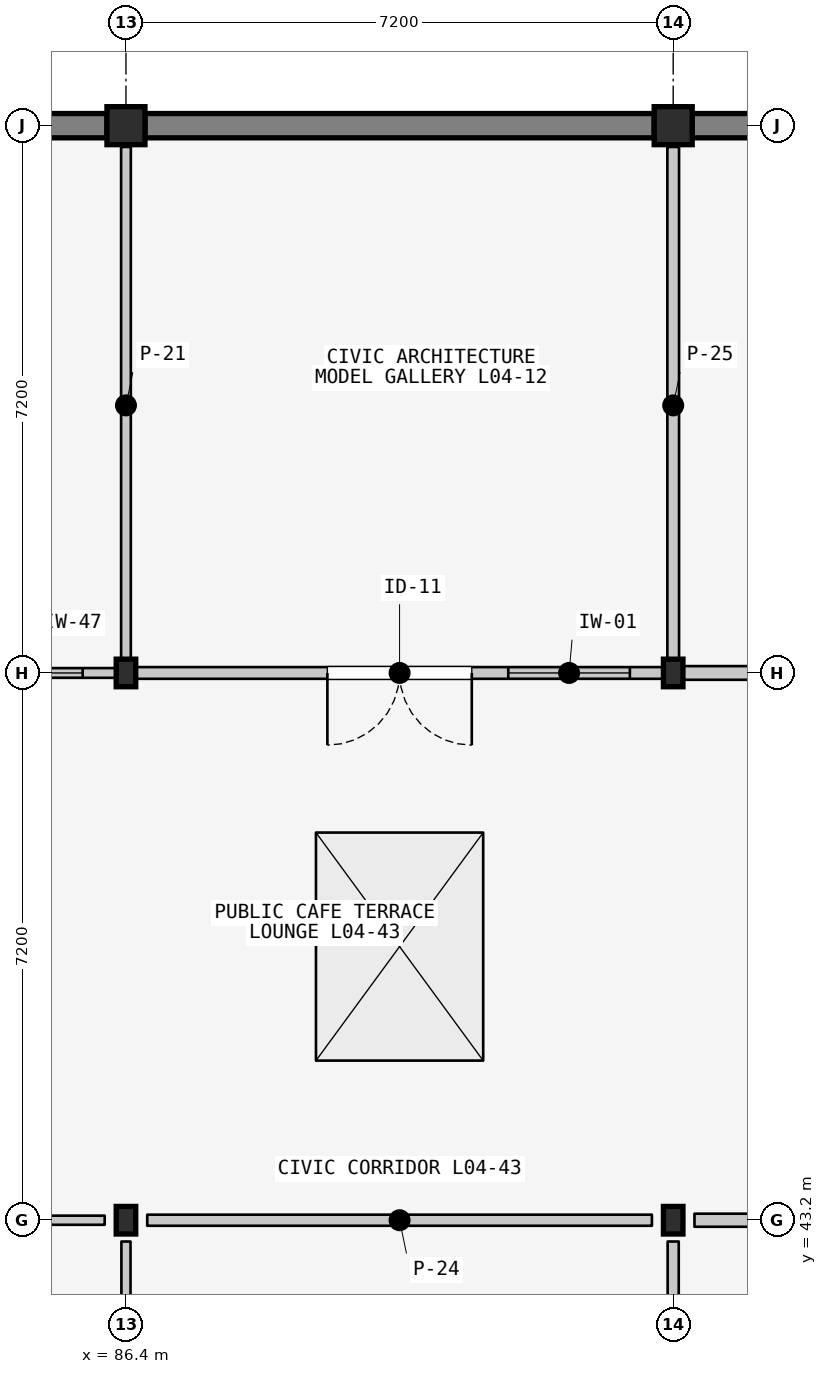
"""IFC4 building model, lengths in metres.
Left out: names, types, materials, properties, quantities, classifications, styles, units other than length and angle.
Written with IfcOpenShell. Run it as: python <this file> out.ifc"""

import sys

from ifc_helpers import new_model, si_unit, direction, frame, frame_2d, origin, origin_2d, place, context, subcontext, project, spatial, rectangle, i_section, extrude, element, fill, save


model = new_model("IFC4")
c1 = context("Model", 3, precision=1e-05, world=origin(), true_north=direction((0.0, 1.0)))
c2 = subcontext(c1, "Body", "Model", "MODEL_VIEW")
j1 = project(units=[si_unit("LENGTHUNIT", "METRE"), si_unit("PLANEANGLEUNIT", "RADIAN")], contexts=[c1])
p1 = place(None, origin())
s1 = spatial("IfcSite", under=j1, at=p1, CompositionType="ELEMENT")
p2 = place(p1, origin())
s2 = spatial("IfcBuilding", under=s1, at=p2, CompositionType="ELEMENT")
p3 = place(p2, frame((0.0, 0.0, 14.1)))
s3 = spatial("IfcBuildingStorey", under=s2, at=p3, CompositionType="ELEMENT", Elevation=14.1)
p4 = place(p3, frame((86.4, 43.2, 0.0), z_axis=(0.0, 0.0, 1.0), x_axis=(1.0, 0.0, 0.0)))
e1 = element("IfcColumn", 1, at=p4, inside=s3, PredefinedType="COLUMN", context=c2, shape_type="SweptSolid", body=[
    extrude(i_section(OverallWidth=0.257, OverallDepth=0.363, WebThickness=0.013, FlangeThickness=0.022, FilletRadius=0.015, at=origin_2d()), origin(), (0.0, 0.0, 1.0), 11.676),
])
p5 = place(p3, frame((86.4, 50.4, 0.0), z_axis=(0.0, 0.0, 1.0), x_axis=(1.0, 0.0, 0.0)))
e2 = element("IfcColumn", 2, at=p5, inside=s3, PredefinedType="COLUMN", context=c2, shape_type="SweptSolid", body=[
    extrude(i_section(OverallWidth=0.257, OverallDepth=0.363, WebThickness=0.013, FlangeThickness=0.022, FilletRadius=0.015, at=origin_2d()), origin(), (0.0, 0.0, 1.0), 13.019),
])
p6 = place(p3, frame((86.4, 57.6, 0.0), z_axis=(0.0, 0.0, 1.0), x_axis=(1.0, 0.0, 0.0)))
e3 = element("IfcColumn", 3, at=p6, inside=s3, PredefinedType="COLUMN", context=c2, shape_type="SweptSolid", body=[
    extrude(rectangle(XDim=0.5, YDim=0.5, at=origin_2d()), origin(), (0.0, 0.0, 1.0), 14.362),
])
p7 = place(p3, frame((93.6, 43.2, 0.0), z_axis=(0.0, 0.0, 1.0), x_axis=(1.0, 0.0, 0.0)))
e4 = element("IfcColumn", 4, at=p7, inside=s3, PredefinedType="COLUMN", context=c2, shape_type="SweptSolid", body=[
    extrude(i_section(OverallWidth=0.257, OverallDepth=0.363, WebThickness=0.013, FlangeThickness=0.022, FilletRadius=0.015, at=origin_2d()), origin(), (0.0, 0.0, 1.0), 11.705),
])
p8 = place(p3, frame((93.6, 50.4, 0.0), z_axis=(0.0, 0.0, 1.0), x_axis=(1.0, 0.0, 0.0)))
e5 = element("IfcColumn", 5, at=p8, inside=s3, PredefinedType="COLUMN", context=c2, shape_type="SweptSolid", body=[
    extrude(i_section(OverallWidth=0.257, OverallDepth=0.363, WebThickness=0.013, FlangeThickness=0.022, FilletRadius=0.015, at=origin_2d()), origin(), (0.0, 0.0, 1.0), 13.048),
])
p9 = place(p3, frame((93.6, 57.6, 0.0), z_axis=(0.0, 0.0, 1.0), x_axis=(1.0, 0.0, 0.0)))
e6 = element("IfcColumn", 6, at=p9, inside=s3, PredefinedType="COLUMN", context=c2, shape_type="SweptSolid", body=[
    extrude(rectangle(XDim=0.5, YDim=0.5, at=origin_2d()), origin(), (0.0, 0.0, 1.0), 14.39),
])
p10 = place(p3, frame((79.45, 57.6, 0.0), z_axis=(0.0, 0.0, 1.0), x_axis=(1.0, 0.0, 0.0)))
e7 = element("IfcWall", 7, at=p10, inside=s3, PredefinedType="SOLIDWALL", context=c2, shape_type="SweptSolid", body=[
    extrude(rectangle(XDim=6.7, YDim=0.32, at=frame_2d((3.35, 0.0))), origin(), (0.0, 0.0, 1.0), 13.606),
])
p11 = place(p3, frame((86.65, 57.6, 0.0), z_axis=(0.0, 0.0, 1.0), x_axis=(1.0, 0.0, 0.0)))
e8 = element("IfcWall", 8, at=p11, inside=s3, PredefinedType="SOLIDWALL", context=c2, shape_type="SweptSolid", body=[
    extrude(rectangle(XDim=6.7, YDim=0.32, at=frame_2d((3.35, 0.0))), origin(), (0.0, 0.0, 1.0), 13.635),
])
p12 = place(p3, frame((93.85, 57.6, 0.0), z_axis=(0.0, 0.0, 1.0), x_axis=(1.0, 0.0, 0.0)))
e9 = element("IfcWall", 9, at=p12, inside=s3, PredefinedType="SOLIDWALL", context=c2, shape_type="SweptSolid", body=[
    extrude(rectangle(XDim=6.7, YDim=0.32, at=frame_2d((3.35, 0.0))), origin(), (0.0, 0.0, 1.0), 13.663),
])
p13 = place(p3, frame((79.48, 43.2, 0.0), z_axis=(0.0, 0.0, 1.0), x_axis=(1.0, 0.0, 0.0)))
e10 = element("IfcWall", 10, at=p13, inside=s3, PredefinedType="PARTITIONING", context=c2, shape_type="SweptSolid", body=[
    extrude(rectangle(XDim=6.64, YDim=0.12, at=frame_2d((3.32, 0.0))), origin(), (0.0, 0.0, 1.0), 3.72),
])
p14 = place(p13, frame((2.545, 0.0, 0.0)))
e11 = element("IfcOpeningElement", 11, at=p14, cuts=e10, PredefinedType="OPENING", context=c2, shape_type="SweptSolid", body=[
    extrude(rectangle(XDim=1.55, YDim=2.3, at=frame_2d((0.775, 1.15))), frame((0.0, 0.07, 0.0), z_axis=(0.0, -1.0, 0.0), x_axis=(1.0, 0.0, 0.0)), (0.0, 0.0, 1.0), 0.14),
])
p15 = place(p13, frame((0.45, 0.0, 1.05)))
e12 = element("IfcOpeningElement", 12, at=p15, cuts=e10, PredefinedType="OPENING", context=c2, shape_type="SweptSolid", body=[
    extrude(rectangle(XDim=1.18, YDim=1.44, at=frame_2d((0.59, 0.72))), frame((0.0, 0.07, 0.0), z_axis=(0.0, -1.0, 0.0), x_axis=(1.0, 0.0, 0.0)), (0.0, 0.0, 1.0), 0.14),
])
p16 = place(p3, frame((86.4, 42.92, 0.0), z_axis=(0.0, 0.0, 1.0), x_axis=(0.0, -1.0, 0.0)))
e13 = element("IfcWall", 13, at=p16, inside=s3, PredefinedType="PARTITIONING", context=c2, shape_type="SweptSolid", body=[
    extrude(rectangle(XDim=6.8, YDim=0.12, at=frame_2d((3.4, 0.0))), origin(), (0.0, 0.0, 1.0), 3.72),
])
p17 = place(p3, frame((86.28, 50.4, 0.0), z_axis=(0.0, 0.0, 1.0), x_axis=(-1.0, 0.0, 0.0)))
e14 = element("IfcWall", 14, at=p17, inside=s3, PredefinedType="PARTITIONING", context=c2, shape_type="SweptSolid", body=[
    extrude(rectangle(XDim=6.96, YDim=0.128, at=frame_2d((3.48, 0.0))), origin(), (0.0, 0.0, 1.0), 3.72),
])
p18 = place(p17, frame((2.53, 0.0, 0.0)))
e15 = element("IfcOpeningElement", 15, at=p18, cuts=e14, PredefinedType="OPENING", context=c2, shape_type="SweptSolid", body=[
    extrude(rectangle(XDim=1.9, YDim=2.45, at=frame_2d((0.95, 1.225))), frame((0.0, 0.074, 0.0), z_axis=(0.0, -1.0, 0.0), x_axis=(1.0, 0.0, 0.0)), (0.0, 0.0, 1.0), 0.148),
])
p19 = place(p17, frame((0.45, 0.0, 1.05)))
e16 = element("IfcOpeningElement", 16, at=p19, cuts=e14, PredefinedType="OPENING", context=c2, shape_type="SweptSolid", body=[
    extrude(rectangle(XDim=1.28, YDim=1.44, at=frame_2d((0.64, 0.72))), frame((0.0, 0.074, 0.0), z_axis=(0.0, -1.0, 0.0), x_axis=(1.0, 0.0, 0.0)), (0.0, 0.0, 1.0), 0.148),
])
p20 = place(p3, frame((86.4, 57.32, 0.0), z_axis=(0.0, 0.0, 1.0), x_axis=(0.0, -1.0, 0.0)))
e17 = element("IfcWall", 17, at=p20, inside=s3, PredefinedType="PARTITIONING", context=c2, shape_type="SweptSolid", body=[
    extrude(rectangle(XDim=6.8, YDim=0.128, at=frame_2d((3.4, 0.0))), origin(), (0.0, 0.0, 1.0), 3.72),
])
p21 = place(p3, frame((93.6, 42.92, 0.0), z_axis=(0.0, 0.0, 1.0), x_axis=(0.0, -1.0, 0.0)))
e18 = element("IfcWall", 18, at=p21, inside=s3, PredefinedType="PARTITIONING", context=c2, shape_type="SweptSolid", body=[
    extrude(rectangle(XDim=6.8, YDim=0.146, at=frame_2d((3.4, 0.0))), origin(), (0.0, 0.0, 1.0), 3.72),
])
p22 = place(p3, frame((86.68, 43.2, 0.0), z_axis=(0.0, 0.0, 1.0), x_axis=(1.0, 0.0, 0.0)))
e19 = element("IfcWall", 19, at=p22, inside=s3, PredefinedType="PARTITIONING", context=c2, shape_type="SweptSolid", body=[
    extrude(rectangle(XDim=6.64, YDim=0.146, at=frame_2d((3.32, 0.0))), origin(), (0.0, 0.0, 1.0), 3.72),
])
p23 = place(p3, frame((93.48, 50.4, 0.0), z_axis=(0.0, 0.0, 1.0), x_axis=(-1.0, 0.0, 0.0)))
e20 = element("IfcWall", 20, at=p23, inside=s3, PredefinedType="PARTITIONING", context=c2, shape_type="SweptSolid", body=[
    extrude(rectangle(XDim=6.96, YDim=0.154, at=frame_2d((3.48, 0.0))), origin(), (0.0, 0.0, 1.0), 3.72),
])
p24 = place(p23, frame((2.53, 0.0, 0.0)))
e21 = element("IfcOpeningElement", 21, at=p24, cuts=e20, PredefinedType="OPENING", context=c2, shape_type="SweptSolid", body=[
    extrude(rectangle(XDim=1.9, YDim=2.45, at=frame_2d((0.95, 1.225))), frame((0.0, 0.087, 0.0), z_axis=(0.0, -1.0, 0.0), x_axis=(1.0, 0.0, 0.0)), (0.0, 0.0, 1.0), 0.174),
])
p25 = place(p23, frame((0.45, 0.0, 1.05)))
e22 = element("IfcOpeningElement", 22, at=p25, cuts=e20, PredefinedType="OPENING", context=c2, shape_type="SweptSolid", body=[
    extrude(rectangle(XDim=1.6, YDim=1.2, at=frame_2d((0.8, 0.6))), frame((0.0, 0.087, 0.0), z_axis=(0.0, -1.0, 0.0), x_axis=(1.0, 0.0, 0.0)), (0.0, 0.0, 1.0), 0.174),
])
p26 = place(p3, frame((93.6, 57.32, 0.0), z_axis=(0.0, 0.0, 1.0), x_axis=(0.0, -1.0, 0.0)))
e23 = element("IfcWall", 23, at=p26, inside=s3, PredefinedType="PARTITIONING", context=c2, shape_type="SweptSolid", body=[
    extrude(rectangle(XDim=6.8, YDim=0.154, at=frame_2d((3.4, 0.0))), origin(), (0.0, 0.0, 1.0), 3.72),
])
p27 = place(p3, frame((93.88, 43.2, 0.0), z_axis=(0.0, 0.0, 1.0), x_axis=(1.0, 0.0, 0.0)))
e24 = element("IfcWall", 24, at=p27, inside=s3, PredefinedType="PARTITIONING", context=c2, shape_type="SweptSolid", body=[
    extrude(rectangle(XDim=6.8, YDim=0.172, at=frame_2d((3.4, 0.0))), origin(), (0.0, 0.0, 1.0), 3.72),
])
p28 = place(p3, frame((100.68, 50.4, 0.0), z_axis=(0.0, 0.0, 1.0), x_axis=(-1.0, 0.0, 0.0)))
e25 = element("IfcWall", 25, at=p28, inside=s3, PredefinedType="PARTITIONING", context=c2, shape_type="SweptSolid", body=[
    extrude(rectangle(XDim=6.96, YDim=0.18, at=frame_2d((3.48, 0.0))), origin(), (0.0, 0.0, 1.0), 3.72),
])
p29 = place(p28, frame((2.53, 0.0, 0.0)))
e26 = element("IfcOpeningElement", 26, at=p29, cuts=e25, PredefinedType="OPENING", context=c2, shape_type="SweptSolid", body=[
    extrude(rectangle(XDim=1.9, YDim=2.45, at=frame_2d((0.95, 1.225))), frame((0.0, 0.1, 0.0), z_axis=(0.0, -1.0, 0.0), x_axis=(1.0, 0.0, 0.0)), (0.0, 0.0, 1.0), 0.2),
])
p30 = place(p3, frame((64.8, 7.2, 5.1), z_axis=(-0.003900009496, -0.183347177316, 0.983040488737), x_axis=(0.999992130387, 0.0, 0.003967261622)))
p31 = place(p30, frame((25.229, 40.283, 0.0)))
p32 = place(p31, origin())
e27 = element("IfcWindow", 27, at=p32, inside=s3, PartitioningType="SINGLE_PANEL", PredefinedType="SKYLIGHT", context=c2, shape_type="SweptSolid", body=[
    extrude(rectangle(XDim=2.2, YDim=3.0, at=origin_2d()), origin(), (0.0, 0.0, -1.0), 0.06),
])
p33 = place(p19, origin())
e28 = element("IfcWindow", 28, at=p33, inside=s3, PartitioningType="SINGLE_PANEL", PredefinedType="WINDOW", context=c2, shape_type="SweptSolid", body=[
    extrude(rectangle(XDim=1.28, YDim=1.44, at=frame_2d((0.64, 0.72))), frame((0.0, 0.03, 0.0), z_axis=(0.0, -1.0, 0.0), x_axis=(1.0, 0.0, 0.0)), (0.0, 0.0, 1.0), 0.06),
])
fill(e16, e28)
p34 = place(p24, origin())
e29 = element("IfcDoor", 29, at=p34, inside=s3, OperationType="DOUBLE_DOOR_SINGLE_SWING", PredefinedType="DOOR", context=c2, shape_type="SweptSolid", body=[
    extrude(rectangle(XDim=1.9, YDim=2.45, at=frame_2d((0.95, 1.225))), frame((0.0, 0.025, 0.0), z_axis=(0.0, -1.0, 0.0), x_axis=(1.0, 0.0, 0.0)), (0.0, 0.0, 1.0), 0.05),
])
fill(e21, e29)
p35 = place(p25, origin())
e30 = element("IfcWindow", 30, at=p35, inside=s3, PartitioningType="SINGLE_PANEL", PredefinedType="WINDOW", context=c2, shape_type="SweptSolid", body=[
    extrude(rectangle(XDim=1.6, YDim=1.2, at=frame_2d((0.8, 0.6))), frame((0.0, 0.03, 0.0), z_axis=(0.0, -1.0, 0.0), x_axis=(1.0, 0.0, 0.0)), (0.0, 0.0, 1.0), 0.06),
])
fill(e22, e30)
save(model, sys.argv[1])
